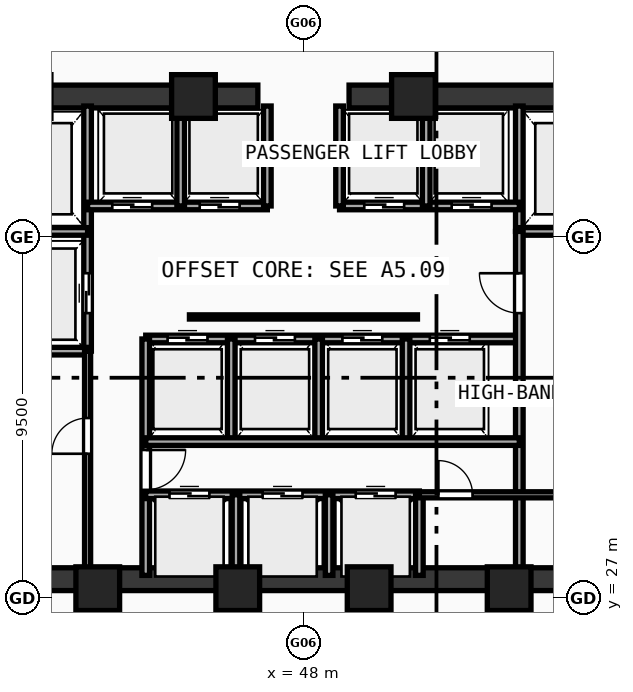
"""IFC4 building model, lengths in metres.
Left out: names, types, materials, properties, quantities, classifications, styles, units other than length and angle.
Written with IfcOpenShell. Run it as: python <this file> out.ifc"""

import sys

from ifc_helpers import new_model, si_unit, direction, frame, frame_2d, origin, origin_with_axes, origin_2d, place, context, subcontext, project, spatial, rectangle, hollow_rectangle, extrude, source, transform, mapped, element, fill, save


model = new_model("IFC4")
c1 = context("Model", 3, precision=1e-05, world=origin(), true_north=direction((0.0, 1.0)))
c2 = subcontext(c1, "Body", "Model", "MODEL_VIEW")
j1 = project(units=[si_unit("LENGTHUNIT", "METRE"), si_unit("PLANEANGLEUNIT", "RADIAN")], contexts=[c1])
p1 = place(None, origin())
s1 = spatial("IfcSite", under=j1, at=p1, CompositionType="ELEMENT")
p2 = place(p1, origin())
s2 = spatial("IfcBuilding", under=s1, at=p2, CompositionType="ELEMENT")
p3 = place(p2, frame((0.0, 0.0, 119.18)))
s3 = spatial("IfcBuildingStorey", under=s2, at=p3, CompositionType="ELEMENT", Elevation=119.18)
p4 = place(p3, frame((35.5, 27.5, 0.0), z_axis=(0.0, 0.0, 1.0), x_axis=(1.0, 0.0, 0.0)))
e1 = element("IfcWall", 1, at=p4, inside=s3, PredefinedType="SHEAR", context=c2, shape_type="SweptSolid", body=[
    extrude(rectangle(XDim=25.0, YDim=0.6, at=frame_2d((12.5, 0.0))), origin(), (0.0, 0.0, 1.0), 5.57),
])
p5 = place(p3, frame((35.5, 40.2, 0.0), z_axis=(0.0, 0.0, 1.0), x_axis=(1.0, 0.0, 0.0)))
e2 = element("IfcWall", 2, at=p5, inside=s3, PredefinedType="SHEAR", context=c2, shape_type="SweptSolid", body=[
    extrude(rectangle(XDim=11.3, YDim=0.6, at=frame_2d((5.65, 0.0))), origin(), (0.0, 0.0, 1.0), 5.57),
])
p6 = place(p5, frame((1.65, 0.0, 0.0)))
e3 = element("IfcOpeningElement", 3, at=p6, cuts=e2, PredefinedType="OPENING", context=c2, shape_type="SweptSolid", body=[
    extrude(rectangle(XDim=1.05, YDim=2.1, at=frame_2d((0.525, 1.05))), frame((0.0, 0.31, 0.0), z_axis=(0.0, -1.0, 0.0), x_axis=(1.0, 0.0, 0.0)), (0.0, 0.0, 1.0), 0.62),
])
p7 = place(p3, frame((49.2, 40.2, 0.0), z_axis=(0.0, 0.0, 1.0), x_axis=(1.0, 0.0, 0.0)))
e4 = element("IfcWall", 4, at=p7, inside=s3, PredefinedType="SHEAR", context=c2, shape_type="SweptSolid", body=[
    extrude(rectangle(XDim=11.3, YDim=0.6, at=frame_2d((5.65, 0.0))), origin(), (0.0, 0.0, 1.0), 5.57),
])
p8 = place(p7, frame((8.6, 0.0, 0.0)))
e5 = element("IfcOpeningElement", 5, at=p8, cuts=e4, PredefinedType="OPENING", context=c2, shape_type="SweptSolid", body=[
    extrude(rectangle(XDim=1.05, YDim=2.1, at=frame_2d((0.525, 1.05))), frame((0.0, 0.31, 0.0), z_axis=(0.0, -1.0, 0.0), x_axis=(1.0, 0.0, 0.0)), (0.0, 0.0, 1.0), 0.62),
])
m1 = source(origin(), c2, "Body", "SweptSolid", [
    extrude(hollow_rectangle(XDim=1.15, YDim=1.15, WallThickness=0.048, at=origin_2d()), origin(), (0.0, 0.0, 1.0), 5.85),
])
for number, where, z_axis, x_axis in (
    (6, (42.588, 27.25, -0.28), (0.0, 0.0, 1.0), (1.0, 0.0, 0.0)),
    (7, (46.272, 27.25, -0.28), (0.0, 0.0, 1.0), (1.0, 0.0, 0.0)),
    (8, (49.729, 27.25, -0.28), (0.0, 0.0, 1.0), (1.0, 0.0, 0.0)),
    (9, (53.412, 27.25, -0.28), (0.0, 0.0, 1.0), (1.0, 0.0, 0.0)),
    (10, (50.894, 40.2, -0.28), (0.0, 0.0, 1.0), (1.0, 0.0, 0.0)),
    (11, (45.106, 40.2, -0.28), (0.0, 0.0, 1.0), (1.0, 0.0, 0.0)),
):
    element("IfcColumn", number, at=place(p3, frame(where, z_axis=z_axis, x_axis=x_axis)), inside=s3, PredefinedType="COLUMN", context=c2, shape_type="MappedRepresentation", body=[
        mapped(m1, transform((0.0, 0.0, 0.0), scale=1.0)),
    ])
p9 = place(p3, frame((42.32, 33.5, 0.0), z_axis=(0.0, 0.0, 1.0), x_axis=(0.0, 1.0, 0.0)))
e12 = element("IfcWall", 12, at=p9, inside=s3, PredefinedType="SOLIDWALL", context=c2, shape_type="SweptSolid", body=[
    extrude(rectangle(XDim=6.45, YDim=0.2, at=frame_2d((3.225, 0.0))), origin(), (0.0, 0.0, 1.0), 5.57),
])
p10 = place(p9, frame((1.0, 0.0, 0.0)))
e13 = element("IfcOpeningElement", 13, at=p10, cuts=e12, PredefinedType="OPENING", context=c2, shape_type="SweptSolid", body=[
    extrude(rectangle(XDim=1.05, YDim=2.1, at=frame_2d((0.525, 1.05))), frame((0.0, 0.11, 0.0), z_axis=(0.0, -1.0, 0.0), x_axis=(1.0, 0.0, 0.0)), (0.0, 0.0, 1.0), 0.22),
])
for number, where, z_axis, x_axis in (
    (14, (39.6, 36.65, 0.0), (0.0, 0.0, 1.0), (1.0, 0.0, 0.0)),
    (15, (39.6, 33.5, 0.0), (0.0, 0.0, 1.0), (1.0, 0.0, 0.0)),
):
    element("IfcWall", number, at=place(p3, frame(where, z_axis=z_axis, x_axis=x_axis)), inside=s3, PredefinedType="SOLIDWALL", context=c2, shape_type="SweptSolid", body=[
        extrude(rectangle(XDim=2.72, YDim=0.2, at=frame_2d((1.36, 0.0))), origin(), (0.0, 0.0, 1.0), 5.57),
    ])
p11 = place(p3, frame((53.68, 36.65, 0.0), z_axis=(0.0, 0.0, 1.0), x_axis=(0.0, 1.0, 0.0)))
e16 = element("IfcWall", 16, at=p11, inside=s3, PredefinedType="SOLIDWALL", context=c2, shape_type="SweptSolid", body=[
    extrude(rectangle(XDim=3.3, YDim=0.2, at=frame_2d((1.65, 0.0))), origin(), (0.0, 0.0, 1.0), 5.57),
])
p12 = place(p3, frame((53.68, 36.65, 0.0), z_axis=(0.0, 0.0, 1.0), x_axis=(1.0, 0.0, 0.0)))
e17 = element("IfcWall", 17, at=p12, inside=s3, PredefinedType="SOLIDWALL", context=c2, shape_type="SweptSolid", body=[
    extrude(rectangle(XDim=2.72, YDim=0.2, at=frame_2d((1.36, 0.0))), origin(), (0.0, 0.0, 1.0), 5.57),
])
p13 = place(p3, frame((42.32, 37.32, 0.0), z_axis=(0.0, 0.0, 1.0), x_axis=(1.0, 0.0, 0.0)))
e18 = element("IfcWall", 18, at=p13, inside=s3, PredefinedType="SOLIDWALL", context=c2, shape_type="SweptSolid", body=[
    extrude(rectangle(XDim=4.73, YDim=0.2, at=frame_2d((2.365, 0.0))), origin(), (0.0, 0.0, 1.0), 5.57),
])
p14 = place(p13, frame((0.65, 0.0, 0.0)))
e19 = element("IfcOpeningElement", 19, at=p14, cuts=e18, PredefinedType="OPENING", context=c2, shape_type="SweptSolid", body=[
    extrude(rectangle(XDim=1.05, YDim=2.1, at=frame_2d((0.525, 1.05))), frame((0.0, 0.11, 0.0), z_axis=(0.0, -1.0, 0.0), x_axis=(1.0, 0.0, 0.0)), (0.0, 0.0, 1.0), 0.22),
])
p15 = place(p13, frame((2.95, 0.0, 0.0)))
e20 = element("IfcOpeningElement", 20, at=p15, cuts=e18, PredefinedType="OPENING", context=c2, shape_type="SweptSolid", body=[
    extrude(rectangle(XDim=1.05, YDim=2.1, at=frame_2d((0.525, 1.05))), frame((0.0, 0.11, 0.0), z_axis=(0.0, -1.0, 0.0), x_axis=(1.0, 0.0, 0.0)), (0.0, 0.0, 1.0), 0.22),
])
p16 = place(p3, frame((48.95, 37.32, 0.0), z_axis=(0.0, 0.0, 1.0), x_axis=(1.0, 0.0, 0.0)))
e21 = element("IfcWall", 21, at=p16, inside=s3, PredefinedType="SOLIDWALL", context=c2, shape_type="SweptSolid", body=[
    extrude(rectangle(XDim=4.73, YDim=0.2, at=frame_2d((2.365, 0.0))), origin(), (0.0, 0.0, 1.0), 5.57),
])
p17 = place(p16, frame((0.65, 0.0, 0.0)))
e22 = element("IfcOpeningElement", 22, at=p17, cuts=e21, PredefinedType="OPENING", context=c2, shape_type="SweptSolid", body=[
    extrude(rectangle(XDim=1.05, YDim=2.1, at=frame_2d((0.525, 1.05))), frame((0.0, 0.11, 0.0), z_axis=(0.0, -1.0, 0.0), x_axis=(1.0, 0.0, 0.0)), (0.0, 0.0, 1.0), 0.22),
])
p18 = place(p16, frame((2.95, 0.0, 0.0)))
e23 = element("IfcOpeningElement", 23, at=p18, cuts=e21, PredefinedType="OPENING", context=c2, shape_type="SweptSolid", body=[
    extrude(rectangle(XDim=1.05, YDim=2.1, at=frame_2d((0.525, 1.05))), frame((0.0, 0.11, 0.0), z_axis=(0.0, -1.0, 0.0), x_axis=(1.0, 0.0, 0.0)), (0.0, 0.0, 1.0), 0.22),
])
for number, where, z_axis, x_axis in (
    (24, (47.05, 37.32, 0.0), (0.0, 0.0, 1.0), (0.0, 1.0, 0.0)),
    (25, (48.95, 37.32, 0.0), (0.0, 0.0, 1.0), (0.0, 1.0, 0.0)),
):
    element("IfcWall", number, at=place(p3, frame(where, z_axis=z_axis, x_axis=x_axis)), inside=s3, PredefinedType="SOLIDWALL", context=c2, shape_type="SweptSolid", body=[
        extrude(rectangle(XDim=2.63, YDim=0.2, at=frame_2d((1.315, 0.0))), origin(), (0.0, 0.0, 1.0), 5.57),
    ])
for number, where, z_axis, x_axis in (
    (26, (44.77, 37.32, 0.0), (0.0, 0.0, 1.0), (0.0, 1.0, 0.0)),
    (27, (51.23, 37.32, 0.0), (0.0, 0.0, 1.0), (0.0, 1.0, 0.0)),
):
    element("IfcWall", number, at=place(p3, frame(where, z_axis=z_axis, x_axis=x_axis)), inside=s3, PredefinedType="SOLIDWALL", context=c2, shape_type="SweptSolid", body=[
        extrude(rectangle(XDim=2.63, YDim=0.2, at=frame_2d((1.315, 0.0))), origin(), (0.0, 0.0, 1.0), 2.22),
    ])
p19 = place(p3, frame((43.85, 33.82, 0.0), z_axis=(0.0, 0.0, 1.0), x_axis=(1.0, 0.0, 0.0)))
e28 = element("IfcWall", 28, at=p19, inside=s3, PredefinedType="SOLIDWALL", context=c2, shape_type="SweptSolid", body=[
    extrude(rectangle(XDim=9.83, YDim=0.2, at=frame_2d((4.915, 0.0))), origin(), (0.0, 0.0, 1.0), 5.57),
])
p20 = place(p19, frame((0.575, 0.0, 0.0)))
e29 = element("IfcOpeningElement", 29, at=p20, cuts=e28, PredefinedType="OPENING", context=c2, shape_type="SweptSolid", body=[
    extrude(rectangle(XDim=1.05, YDim=2.1, at=frame_2d((0.525, 1.05))), frame((0.0, 0.11, 0.0), z_axis=(0.0, -1.0, 0.0), x_axis=(1.0, 0.0, 0.0)), (0.0, 0.0, 1.0), 0.22),
])
p21 = place(p19, frame((2.875, 0.0, 0.0)))
e30 = element("IfcOpeningElement", 30, at=p21, cuts=e28, PredefinedType="OPENING", context=c2, shape_type="SweptSolid", body=[
    extrude(rectangle(XDim=1.05, YDim=2.1, at=frame_2d((0.525, 1.05))), frame((0.0, 0.11, 0.0), z_axis=(0.0, -1.0, 0.0), x_axis=(1.0, 0.0, 0.0)), (0.0, 0.0, 1.0), 0.22),
])
p22 = place(p19, frame((5.175, 0.0, 0.0)))
e31 = element("IfcOpeningElement", 31, at=p22, cuts=e28, PredefinedType="OPENING", context=c2, shape_type="SweptSolid", body=[
    extrude(rectangle(XDim=1.05, YDim=2.1, at=frame_2d((0.525, 1.05))), frame((0.0, 0.11, 0.0), z_axis=(0.0, -1.0, 0.0), x_axis=(1.0, 0.0, 0.0)), (0.0, 0.0, 1.0), 0.22),
])
p23 = place(p19, frame((7.475, 0.0, 0.0)))
e32 = element("IfcOpeningElement", 32, at=p23, cuts=e28, PredefinedType="OPENING", context=c2, shape_type="SweptSolid", body=[
    extrude(rectangle(XDim=1.05, YDim=2.1, at=frame_2d((0.525, 1.05))), frame((0.0, 0.11, 0.0), z_axis=(0.0, -1.0, 0.0), x_axis=(1.0, 0.0, 0.0)), (0.0, 0.0, 1.0), 0.22),
])
p24 = place(p3, frame((43.85, 27.6, 0.0), z_axis=(0.0, 0.0, 1.0), x_axis=(0.0, 1.0, 0.0)))
e33 = element("IfcWall", 33, at=p24, inside=s3, PredefinedType="SOLIDWALL", context=c2, shape_type="SweptSolid", body=[
    extrude(rectangle(XDim=6.22, YDim=0.2, at=frame_2d((3.11, 0.0))), origin(), (0.0, 0.0, 1.0), 5.57),
])
p25 = place(p24, frame((2.25, 0.0, 0.0)))
e34 = element("IfcOpeningElement", 34, at=p25, cuts=e33, PredefinedType="OPENING", context=c2, shape_type="SweptSolid", body=[
    extrude(rectangle(XDim=1.05, YDim=2.1, at=frame_2d((0.525, 1.05))), frame((0.0, 0.11, 0.0), z_axis=(0.0, -1.0, 0.0), x_axis=(1.0, 0.0, 0.0)), (0.0, 0.0, 1.0), 0.22),
])
p26 = place(p3, frame((53.68, 27.6, 0.0), z_axis=(0.0, 0.0, 1.0), x_axis=(0.0, 1.0, 0.0)))
e35 = element("IfcWall", 35, at=p26, inside=s3, PredefinedType="SOLIDWALL", context=c2, shape_type="SweptSolid", body=[
    extrude(rectangle(XDim=9.05, YDim=0.2, at=frame_2d((4.525, 0.0))), origin(), (0.0, 0.0, 1.0), 2.22),
])
p27 = place(p26, frame((6.9, 0.0, 0.0)))
e36 = element("IfcOpeningElement", 36, at=p27, cuts=e35, PredefinedType="OPENING", context=c2, shape_type="SweptSolid", body=[
    extrude(rectangle(XDim=1.05, YDim=2.1, at=frame_2d((0.525, 1.05))), frame((0.0, 0.11, 0.0), z_axis=(0.0, -1.0, 0.0), x_axis=(1.0, 0.0, 0.0)), (0.0, 0.0, 1.0), 0.22),
])
for number, where, z_axis, x_axis in (
    (37, (46.1, 31.12, 0.0), (0.0, 0.0, 1.0), (0.0, 1.0, 0.0)),
    (38, (48.4, 31.12, 0.0), (0.0, 0.0, 1.0), (0.0, 1.0, 0.0)),
    (39, (50.7, 31.12, 0.0), (0.0, 0.0, 1.0), (0.0, 1.0, 0.0)),
):
    element("IfcWall", number, at=place(p3, frame(where, z_axis=z_axis, x_axis=x_axis)), inside=s3, PredefinedType="SOLIDWALL", context=c2, shape_type="SweptSolid", body=[
        extrude(rectangle(XDim=2.7, YDim=0.2, at=frame_2d((1.35, 0.0))), origin(), (0.0, 0.0, 1.0), 5.57),
    ])
p28 = place(p3, frame((43.85, 29.72, 0.0), z_axis=(0.0, 0.0, 1.0), x_axis=(1.0, 0.0, 0.0)))
e40 = element("IfcWall", 40, at=p28, inside=s3, PredefinedType="SOLIDWALL", context=c2, shape_type="SweptSolid", body=[
    extrude(rectangle(XDim=7.2, YDim=0.2, at=frame_2d((3.6, 0.0))), origin(), (0.0, 0.0, 1.0), 5.57),
])
p29 = place(p28, frame((0.625, 0.0, 0.0)))
e41 = element("IfcOpeningElement", 41, at=p29, cuts=e40, PredefinedType="OPENING", context=c2, shape_type="SweptSolid", body=[
    extrude(rectangle(XDim=1.05, YDim=2.1, at=frame_2d((0.525, 1.05))), frame((0.0, 0.11, 0.0), z_axis=(0.0, -1.0, 0.0), x_axis=(1.0, 0.0, 0.0)), (0.0, 0.0, 1.0), 0.22),
])
p30 = place(p28, frame((3.075, 0.0, 0.0)))
e42 = element("IfcOpeningElement", 42, at=p30, cuts=e40, PredefinedType="OPENING", context=c2, shape_type="SweptSolid", body=[
    extrude(rectangle(XDim=1.05, YDim=2.1, at=frame_2d((0.525, 1.05))), frame((0.0, 0.11, 0.0), z_axis=(0.0, -1.0, 0.0), x_axis=(1.0, 0.0, 0.0)), (0.0, 0.0, 1.0), 0.22),
])
p31 = place(p28, frame((5.525, 0.0, 0.0)))
e43 = element("IfcOpeningElement", 43, at=p31, cuts=e40, PredefinedType="OPENING", context=c2, shape_type="SweptSolid", body=[
    extrude(rectangle(XDim=1.05, YDim=2.1, at=frame_2d((0.525, 1.05))), frame((0.0, 0.11, 0.0), z_axis=(0.0, -1.0, 0.0), x_axis=(1.0, 0.0, 0.0)), (0.0, 0.0, 1.0), 0.22),
])
p32 = place(p3, frame((51.05, 27.6, 0.0), z_axis=(0.0, 0.0, 1.0), x_axis=(0.0, 1.0, 0.0)))
e44 = element("IfcWall", 44, at=p32, inside=s3, PredefinedType="SOLIDWALL", context=c2, shape_type="SweptSolid", body=[
    extrude(rectangle(XDim=2.12, YDim=0.2, at=frame_2d((1.06, 0.0))), origin(), (0.0, 0.0, 1.0), 5.57),
])
p33 = place(p3, frame((43.85, 31.12, 0.0), z_axis=(0.0, 0.0, 1.0), x_axis=(1.0, 0.0, 0.0)))
e45 = element("IfcWall", 45, at=p33, inside=s3, PredefinedType="SOLIDWALL", context=c2, shape_type="SweptSolid", body=[
    extrude(rectangle(XDim=9.83, YDim=0.2, at=frame_2d((4.915, 0.0))), origin(), (0.0, 0.0, 1.0), 5.57),
])
p34 = place(p3, frame((46.225, 27.6, 0.0), z_axis=(0.0, 0.0, 1.0), x_axis=(0.0, 1.0, 0.0)))
e46 = element("IfcWall", 46, at=p34, inside=s3, PredefinedType="SOLIDWALL", context=c2, shape_type="SweptSolid", body=[
    extrude(rectangle(XDim=2.12, YDim=0.2, at=frame_2d((1.06, 0.0))), origin(), (0.0, 0.0, 1.0), 2.22),
])
p35 = place(p3, frame((48.675, 27.6, 0.0), z_axis=(0.0, 0.0, 1.0), x_axis=(0.0, 1.0, 0.0)))
e47 = element("IfcWall", 47, at=p35, inside=s3, PredefinedType="SOLIDWALL", context=c2, shape_type="SweptSolid", body=[
    extrude(rectangle(XDim=2.12, YDim=0.2, at=frame_2d((1.06, 0.0))), origin(), (0.0, 0.0, 1.0), 5.57),
])
p36 = place(p3, frame((42.32, 27.6, 0.0), z_axis=(0.0, 0.0, 1.0), x_axis=(0.0, 1.0, 0.0)))
e48 = element("IfcWall", 48, at=p36, inside=s3, PredefinedType="PARTITIONING", context=c2, shape_type="SweptSolid", body=[
    extrude(rectangle(XDim=5.9, YDim=0.16, at=frame_2d((2.95, 0.0))), origin(), (0.0, 0.0, 1.0), 2.22),
])
p37 = place(p36, frame((3.2, 0.0, 0.0)))
e49 = element("IfcOpeningElement", 49, at=p37, cuts=e48, PredefinedType="OPENING", context=c2, shape_type="SweptSolid", body=[
    extrude(rectangle(XDim=0.94, YDim=2.1, at=frame_2d((0.47, 1.05))), frame((0.0, 0.09, 0.0), z_axis=(0.0, -1.0, 0.0), x_axis=(1.0, 0.0, 0.0)), (0.0, 0.0, 1.0), 0.18),
])
p38 = place(p3, frame((51.05, 29.72, 0.0), z_axis=(0.0, 0.0, 1.0), x_axis=(1.0, 0.0, 0.0)))
e50 = element("IfcWall", 50, at=p38, inside=s3, PredefinedType="PARTITIONING", context=c2, shape_type="SweptSolid", body=[
    extrude(rectangle(XDim=4.07, YDim=0.16, at=frame_2d((2.035, 0.0))), origin(), (0.0, 0.0, 1.0), 5.57),
])
p39 = place(p38, frame((0.5, 0.0, 0.0)))
e51 = element("IfcOpeningElement", 51, at=p39, cuts=e50, PredefinedType="OPENING", context=c2, shape_type="SweptSolid", body=[
    extrude(rectangle(XDim=0.9, YDim=2.1, at=frame_2d((0.45, 1.05))), frame((0.0, 0.09, 0.0), z_axis=(0.0, -1.0, 0.0), x_axis=(1.0, 0.0, 0.0)), (0.0, 0.0, 1.0), 0.18),
])
p40 = place(p3, frame((45.0, 34.4, 0.0), z_axis=(0.0, 0.0, 1.0), x_axis=(1.0, 0.0, 0.0)))
e52 = element("IfcWall", 52, at=p40, inside=s3, PredefinedType="MOVABLE", context=c2, shape_type="SweptSolid", body=[
    extrude(rectangle(XDim=6.0, YDim=0.11, at=frame_2d((3.0, 0.0))), origin(), (0.0, 0.0, 1.0), 2.5),
])
m2 = source(origin(), c2, "Body", "SweptSolid", [
    extrude(rectangle(XDim=1.05, YDim=2.1, at=frame_2d((0.525, 1.05))), frame((0.0, 0.025, 0.0), z_axis=(0.0, -1.0, 0.0), x_axis=(1.0, 0.0, 0.0)), (0.0, 0.0, 1.0), 0.05),
])
p41 = place(p10, origin_with_axes())
e53 = element("IfcDoor", 53, at=p41, inside=s3, OperationType="DOUBLE_DOOR_SLIDING", PredefinedType="DOOR", context=c2, shape_type="MappedRepresentation", body=[
    mapped(m2, transform((0.0, 0.0, 0.0), scale=1.0)),
])
fill(e13, e53)
p42 = place(p14, frame((1.05, 0.0, 0.0), z_axis=(0.0, 0.0, 1.0), x_axis=(-1.0, 0.0, 0.0)))
e54 = element("IfcDoor", 54, at=p42, inside=s3, OperationType="DOUBLE_DOOR_SLIDING", PredefinedType="DOOR", context=c2, shape_type="MappedRepresentation", body=[
    mapped(m2, transform((0.0, 0.0, 0.0), scale=1.0)),
])
fill(e19, e54)
p43 = place(p15, frame((1.05, 0.0, 0.0), z_axis=(0.0, 0.0, 1.0), x_axis=(-1.0, 0.0, 0.0)))
e55 = element("IfcDoor", 55, at=p43, inside=s3, OperationType="DOUBLE_DOOR_SLIDING", PredefinedType="DOOR", context=c2, shape_type="MappedRepresentation", body=[
    mapped(m2, transform((0.0, 0.0, 0.0), scale=1.0)),
])
fill(e20, e55)
p44 = place(p17, frame((1.05, 0.0, 0.0), z_axis=(0.0, 0.0, 1.0), x_axis=(-1.0, 0.0, 0.0)))
e56 = element("IfcDoor", 56, at=p44, inside=s3, OperationType="DOUBLE_DOOR_SLIDING", PredefinedType="DOOR", context=c2, shape_type="MappedRepresentation", body=[
    mapped(m2, transform((0.0, 0.0, 0.0), scale=1.0)),
])
fill(e22, e56)
p45 = place(p18, frame((1.05, 0.0, 0.0), z_axis=(0.0, 0.0, 1.0), x_axis=(-1.0, 0.0, 0.0)))
e57 = element("IfcDoor", 57, at=p45, inside=s3, OperationType="DOUBLE_DOOR_SLIDING", PredefinedType="DOOR", context=c2, shape_type="MappedRepresentation", body=[
    mapped(m2, transform((0.0, 0.0, 0.0), scale=1.0)),
])
fill(e23, e57)
p46 = place(p20, origin_with_axes())
e58 = element("IfcDoor", 58, at=p46, inside=s3, OperationType="DOUBLE_DOOR_SLIDING", PredefinedType="DOOR", context=c2, shape_type="MappedRepresentation", body=[
    mapped(m2, transform((0.0, 0.0, 0.0), scale=1.0)),
])
fill(e29, e58)
p47 = place(p21, origin_with_axes())
e59 = element("IfcDoor", 59, at=p47, inside=s3, OperationType="DOUBLE_DOOR_SLIDING", PredefinedType="DOOR", context=c2, shape_type="MappedRepresentation", body=[
    mapped(m2, transform((0.0, 0.0, 0.0), scale=1.0)),
])
fill(e30, e59)
p48 = place(p22, origin_with_axes())
e60 = element("IfcDoor", 60, at=p48, inside=s3, OperationType="DOUBLE_DOOR_SLIDING", PredefinedType="DOOR", context=c2, shape_type="MappedRepresentation", body=[
    mapped(m2, transform((0.0, 0.0, 0.0), scale=1.0)),
])
fill(e31, e60)
p49 = place(p23, origin_with_axes())
e61 = element("IfcDoor", 61, at=p49, inside=s3, OperationType="DOUBLE_DOOR_SLIDING", PredefinedType="DOOR", context=c2, shape_type="MappedRepresentation", body=[
    mapped(m2, transform((0.0, 0.0, 0.0), scale=1.0)),
])
fill(e32, e61)
p50 = place(p25, frame((1.05, 0.0, 0.0), z_axis=(0.0, 0.0, 1.0), x_axis=(-1.0, 0.0, 0.0)))
e62 = element("IfcDoor", 62, at=p50, inside=s3, OperationType="SINGLE_SWING_LEFT", PredefinedType="DOOR", context=c2, shape_type="MappedRepresentation", body=[
    mapped(m2, transform((0.0, 0.0, 0.0), scale=1.0)),
])
fill(e34, e62)
p51 = place(p27, origin_with_axes())
e63 = element("IfcDoor", 63, at=p51, inside=s3, OperationType="SINGLE_SWING_RIGHT", PredefinedType="DOOR", context=c2, shape_type="MappedRepresentation", body=[
    mapped(m2, transform((0.0, 0.0, 0.0), scale=1.0)),
])
fill(e36, e63)
p52 = place(p29, origin_with_axes())
e64 = element("IfcDoor", 64, at=p52, inside=s3, OperationType="DOUBLE_DOOR_SLIDING", PredefinedType="DOOR", context=c2, shape_type="MappedRepresentation", body=[
    mapped(m2, transform((0.0, 0.0, 0.0), scale=1.0)),
])
fill(e41, e64)
p53 = place(p30, origin_with_axes())
e65 = element("IfcDoor", 65, at=p53, inside=s3, OperationType="DOUBLE_DOOR_SLIDING", PredefinedType="DOOR", context=c2, shape_type="MappedRepresentation", body=[
    mapped(m2, transform((0.0, 0.0, 0.0), scale=1.0)),
])
fill(e42, e65)
p54 = place(p31, origin_with_axes())
e66 = element("IfcDoor", 66, at=p54, inside=s3, OperationType="DOUBLE_DOOR_SLIDING", PredefinedType="DOOR", context=c2, shape_type="MappedRepresentation", body=[
    mapped(m2, transform((0.0, 0.0, 0.0), scale=1.0)),
])
fill(e43, e66)
m3 = source(origin(), c2, "Body", "SweptSolid", [
    extrude(rectangle(XDim=0.94, YDim=2.1, at=frame_2d((0.47, 1.05))), frame((0.0, 0.025, 0.0), z_axis=(0.0, -1.0, 0.0), x_axis=(1.0, 0.0, 0.0)), (0.0, 0.0, 1.0), 0.05),
])
p55 = place(p37, origin_with_axes())
e67 = element("IfcDoor", 67, at=p55, inside=s3, OperationType="SINGLE_SWING_LEFT", PredefinedType="DOOR", context=c2, shape_type="MappedRepresentation", body=[
    mapped(m3, transform((0.0, 0.0, 0.0), scale=1.0)),
])
fill(e49, e67)
m4 = source(origin(), c2, "Body", "SweptSolid", [
    extrude(rectangle(XDim=0.9, YDim=2.1, at=frame_2d((0.45, 1.05))), frame((0.0, 0.025, 0.0), z_axis=(0.0, -1.0, 0.0), x_axis=(1.0, 0.0, 0.0)), (0.0, 0.0, 1.0), 0.05),
])
p56 = place(p39, origin_with_axes())
e68 = element("IfcDoor", 68, at=p56, inside=s3, OperationType="SINGLE_SWING_LEFT", PredefinedType="DOOR", context=c2, shape_type="MappedRepresentation", body=[
    mapped(m4, transform((0.0, 0.0, 0.0), scale=1.0)),
])
fill(e51, e68)
save(model, sys.argv[1])
